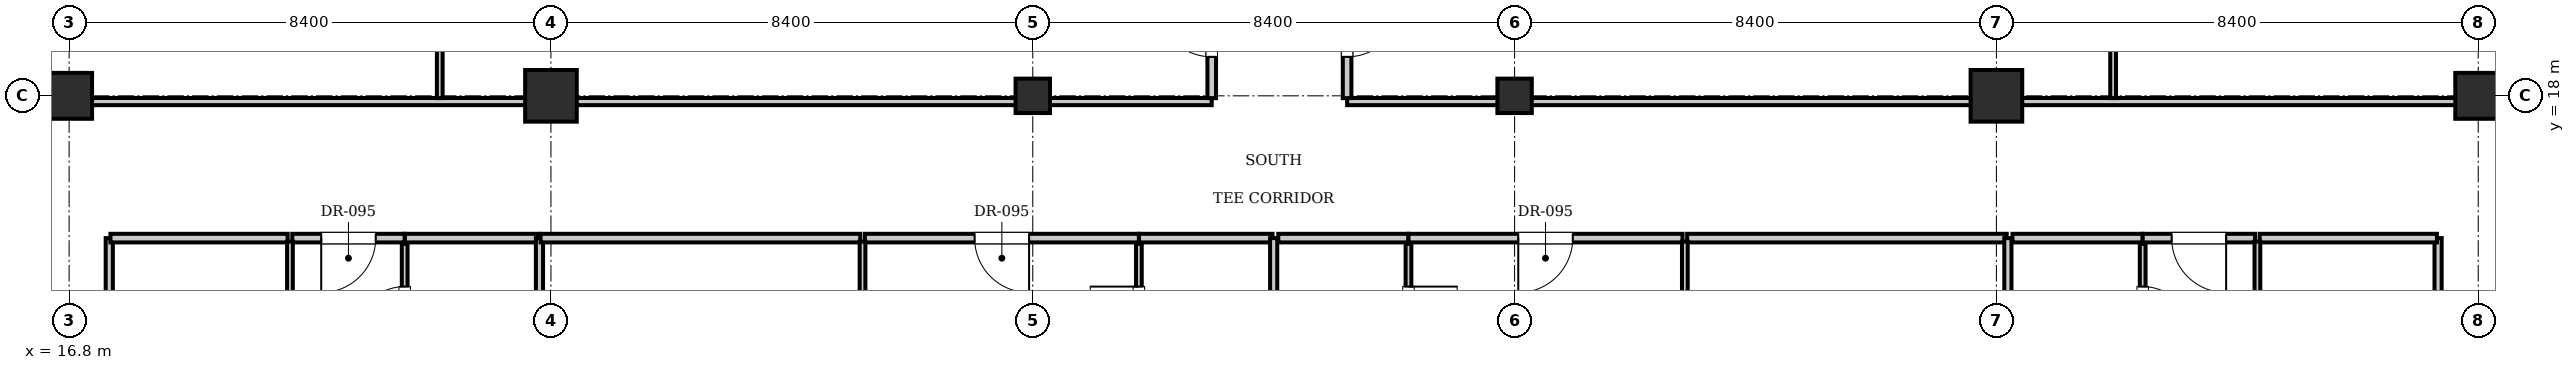
"""IFC4 building model, lengths in metres.
Left out: names, types, materials, properties, quantities, classifications, styles, units other than length and angle.
Written with IfcOpenShell. Run it as: python <this file> out.ifc"""

import sys

from ifc_helpers import new_model, si_unit, direction, frame, frame_2d, origin, origin_2d, place, context, subcontext, project, spatial, rectangle, i_section, extrude, element, fill, save


model = new_model("IFC4")
c1 = context("Model", 3, precision=1e-05, world=origin(), true_north=direction((0.0, 1.0)))
c2 = subcontext(c1, "Body", "Model", "MODEL_VIEW")
j1 = project(units=[si_unit("LENGTHUNIT", "METRE"), si_unit("PLANEANGLEUNIT", "RADIAN")], contexts=[c1])
p1 = place(None, origin())
s1 = spatial("IfcSite", under=j1, at=p1, CompositionType="ELEMENT")
p2 = place(p1, origin())
s2 = spatial("IfcBuilding", under=s1, at=p2, CompositionType="ELEMENT")
p3 = place(p2, frame((0.0, 0.0, 208.25)))
s3 = spatial("IfcBuildingStorey", under=s2, at=p3, CompositionType="ELEMENT", Elevation=208.25)
for number, where, z_axis, x_axis in (
    (1, (25.2, 18.0, 0.0), (0.0, 0.0, 1.0), (1.0, 0.0, 0.0)),
    (2, (50.4, 18.0, 0.0), (0.0, 0.0, 1.0), (1.0, 0.0, 0.0)),
):
    element("IfcColumn", number, at=place(p3, frame(where, z_axis=z_axis, x_axis=x_axis)), inside=s3, PredefinedType="COLUMN", context=c2, shape_type="SweptSolid", body=[
        extrude(rectangle(XDim=0.9, YDim=0.9, at=origin_2d()), origin(), (0.0, 0.0, 1.0), 3.85),
    ])
for number, where, z_axis, x_axis in (
    (3, (33.6, 18.0, 0.0), (0.0, 0.0, 1.0), (1.0, 0.0, 0.0)),
    (4, (42.0, 18.0, 0.0), (0.0, 0.0, 1.0), (1.0, 0.0, 0.0)),
):
    element("IfcColumn", number, at=place(p3, frame(where, z_axis=z_axis, x_axis=x_axis)), inside=s3, PredefinedType="COLUMN", context=c2, shape_type="SweptSolid", body=[
        extrude(i_section(OverallWidth=0.6, OverallDepth=0.6, WebThickness=0.025, FlangeThickness=0.038, at=origin_2d()), origin(), (0.0, 0.0, 1.0), 3.85),
    ])
for number, where, z_axis, x_axis in (
    (5, (16.8, 18.0, 0.0), (0.0, 0.0, 1.0), (1.0, 0.0, 0.0)),
    (6, (58.8, 18.0, 0.0), (0.0, 0.0, 1.0), (1.0, 0.0, 0.0)),
):
    element("IfcColumn", number, at=place(p3, frame(where, z_axis=z_axis, x_axis=x_axis)), inside=s3, PredefinedType="COLUMN", context=c2, shape_type="SweptSolid", body=[
        extrude(rectangle(XDim=0.8, YDim=0.8, at=origin_2d()), origin(), (0.0, 0.0, 1.0), 3.85),
    ])
for number, where, z_axis, x_axis in (
    (7, (17.5, 9.0, 0.0), (0.0, 0.0, 1.0), (0.0, 1.0, 0.0)),
    (8, (58.1, 9.0, 0.0), (0.0, 0.0, 1.0), (0.0, 1.0, 0.0)),
):
    element("IfcWall", number, at=place(p3, frame(where, z_axis=z_axis, x_axis=x_axis)), inside=s3, PredefinedType="PARTITIONING", context=c2, shape_type="SweptSolid", body=[
        extrude(rectangle(XDim=6.52, YDim=0.125, at=frame_2d((3.26, 0.0))), origin(), (0.0, 0.0, 1.0), 3.61),
    ])
p4 = place(p3, frame((22.65, 15.52, 0.0), z_axis=(0.0, 0.0, 1.0), x_axis=(1.0, 0.0, 0.0)))
e9 = element("IfcWall", 9, at=p4, inside=s3, PredefinedType="PARTITIONING", context=c2, shape_type="SweptSolid", body=[
    extrude(rectangle(XDim=2.33, YDim=0.15, at=frame_2d((1.165, 0.0))), origin(), (0.0, 0.0, 1.0), 3.61),
])
p5 = place(p3, frame((22.65, 13.08, 0.0), z_axis=(0.0, 0.0, 1.0), x_axis=(0.0, 1.0, 0.0)))
e10 = element("IfcWall", 10, at=p5, inside=s3, PredefinedType="PARTITIONING", context=c2, shape_type="SweptSolid", body=[
    extrude(rectangle(XDim=2.34, YDim=0.1, at=frame_2d((1.17, 0.0))), origin(), (0.0, 0.0, 1.0), 3.61),
])
p6 = place(p5, frame((0.745, 0.0, 0.0)))
e11 = element("IfcOpeningElement", 11, at=p6, cuts=e10, PredefinedType="OPENING", context=c2, shape_type="SweptSolid", body=[
    extrude(rectangle(XDim=0.85, YDim=2.1, at=frame_2d((0.425, 1.05))), frame((0.0, 0.06, 0.0), z_axis=(0.0, -1.0, 0.0), x_axis=(1.0, 0.0, 0.0)), (0.0, 0.0, 1.0), 0.12),
])
p7 = place(p3, frame((17.52, 15.52, 0.0), z_axis=(0.0, 0.0, 1.0), x_axis=(1.0, 0.0, 0.0)))
e12 = element("IfcWall", 12, at=p7, inside=s3, PredefinedType="PARTITIONING", context=c2, shape_type="SweptSolid", body=[
    extrude(rectangle(XDim=3.09, YDim=0.15, at=frame_2d((1.545, 0.0))), origin(), (0.0, 0.0, 1.0), 3.61),
])
p8 = place(p3, frame((20.69, 15.52, 0.0), z_axis=(0.0, 0.0, 1.0), x_axis=(1.0, 0.0, 0.0)))
e13 = element("IfcWall", 13, at=p8, inside=s3, PredefinedType="PARTITIONING", context=c2, shape_type="SweptSolid", body=[
    extrude(rectangle(XDim=1.96, YDim=0.15, at=frame_2d((0.98, 0.0))), origin(), (0.0, 0.0, 1.0), 3.61),
])
p9 = place(p8, frame((0.505, 0.0, 0.0)))
e14 = element("IfcOpeningElement", 14, at=p9, cuts=e13, PredefinedType="OPENING", context=c2, shape_type="SweptSolid", body=[
    extrude(rectangle(XDim=0.95, YDim=2.15, at=frame_2d((0.475, 1.075))), frame((0.0, 0.085, 0.0), z_axis=(0.0, -1.0, 0.0), x_axis=(1.0, 0.0, 0.0)), (0.0, 0.0, 1.0), 0.17),
])
p10 = place(p3, frame((20.65, 4.63, 0.0), z_axis=(0.0, 0.0, 1.0), x_axis=(0.0, 1.0, 0.0)))
e15 = element("IfcWall", 15, at=p10, inside=s3, PredefinedType="PARTITIONING", context=c2, shape_type="SweptSolid", body=[
    extrude(rectangle(XDim=10.83, YDim=0.1, at=frame_2d((5.415, 0.0))), origin(), (0.0, 0.0, 1.0), 3.61),
])
p11 = place(p10, frame((1.6, 0.0, 0.0)))
e16 = element("IfcOpeningElement", 16, at=p11, cuts=e15, PredefinedType="OPENING", context=c2, shape_type="SweptSolid", body=[
    extrude(rectangle(XDim=0.9, YDim=2.1, at=frame_2d((0.45, 1.05))), frame((0.0, 0.06, 0.0), z_axis=(0.0, -1.0, 0.0), x_axis=(1.0, 0.0, 0.0)), (0.0, 0.0, 1.0), 0.12),
])
p12 = place(p3, frame((25.0, 4.7, 0.0), z_axis=(0.0, 0.0, 1.0), x_axis=(0.0, 1.0, 0.0)))
e17 = element("IfcWall", 17, at=p12, inside=s3, PredefinedType="PARTITIONING", context=c2, shape_type="SweptSolid", body=[
    extrude(rectangle(XDim=10.82, YDim=0.125, at=frame_2d((5.41, 0.0))), origin(), (0.0, 0.0, 1.0), 3.61),
])
p13 = place(p3, frame((35.45, 15.52, 0.0), z_axis=(0.0, 0.0, 1.0), x_axis=(1.0, 0.0, 0.0)))
e18 = element("IfcWall", 18, at=p13, inside=s3, PredefinedType="PARTITIONING", context=c2, shape_type="SweptSolid", body=[
    extrude(rectangle(XDim=2.33, YDim=0.15, at=frame_2d((1.165, 0.0))), origin(), (0.0, 0.0, 1.0), 3.61),
])
p14 = place(p3, frame((35.45, 13.08, 0.0), z_axis=(0.0, 0.0, 1.0), x_axis=(0.0, 1.0, 0.0)))
e19 = element("IfcWall", 19, at=p14, inside=s3, PredefinedType="PARTITIONING", context=c2, shape_type="SweptSolid", body=[
    extrude(rectangle(XDim=2.34, YDim=0.1, at=frame_2d((1.17, 0.0))), origin(), (0.0, 0.0, 1.0), 3.61),
])
p15 = place(p14, frame((0.745, 0.0, 0.0)))
e20 = element("IfcOpeningElement", 20, at=p15, cuts=e19, PredefinedType="OPENING", context=c2, shape_type="SweptSolid", body=[
    extrude(rectangle(XDim=0.85, YDim=2.1, at=frame_2d((0.425, 1.05))), frame((0.0, 0.06, 0.0), z_axis=(0.0, -1.0, 0.0), x_axis=(1.0, 0.0, 0.0)), (0.0, 0.0, 1.0), 0.12),
])
p16 = place(p3, frame((25.02, 15.52, 0.0), z_axis=(0.0, 0.0, 1.0), x_axis=(1.0, 0.0, 0.0)))
e21 = element("IfcWall", 21, at=p16, inside=s3, PredefinedType="PARTITIONING", context=c2, shape_type="SweptSolid", body=[
    extrude(rectangle(XDim=5.572, YDim=0.15, at=frame_2d((2.786, 0.0))), origin(), (0.0, 0.0, 1.0), 3.61),
])
p17 = place(p3, frame((30.672, 15.52, 0.0), z_axis=(0.0, 0.0, 1.0), x_axis=(1.0, 0.0, 0.0)))
e22 = element("IfcWall", 22, at=p17, inside=s3, PredefinedType="PARTITIONING", context=c2, shape_type="SweptSolid", body=[
    extrude(rectangle(XDim=4.778, YDim=0.15, at=frame_2d((2.389, 0.0))), origin(), (0.0, 0.0, 1.0), 3.61),
])
p18 = place(p17, frame((1.914, 0.0, 0.0)))
e23 = element("IfcOpeningElement", 23, at=p18, cuts=e22, PredefinedType="OPENING", context=c2, shape_type="SweptSolid", body=[
    extrude(rectangle(XDim=0.95, YDim=2.15, at=frame_2d((0.475, 1.075))), frame((0.0, 0.085, 0.0), z_axis=(0.0, -1.0, 0.0), x_axis=(1.0, 0.0, 0.0)), (0.0, 0.0, 1.0), 0.17),
])
p19 = place(p3, frame((30.632, 4.63, 0.0), z_axis=(0.0, 0.0, 1.0), x_axis=(0.0, 1.0, 0.0)))
e24 = element("IfcWall", 24, at=p19, inside=s3, PredefinedType="PARTITIONING", context=c2, shape_type="SweptSolid", body=[
    extrude(rectangle(XDim=10.83, YDim=0.1, at=frame_2d((5.415, 0.0))), origin(), (0.0, 0.0, 1.0), 3.61),
])
p20 = place(p19, frame((1.6, 0.0, 0.0)))
e25 = element("IfcOpeningElement", 25, at=p20, cuts=e24, PredefinedType="OPENING", context=c2, shape_type="SweptSolid", body=[
    extrude(rectangle(XDim=0.9, YDim=2.1, at=frame_2d((0.45, 1.05))), frame((0.0, 0.06, 0.0), z_axis=(0.0, -1.0, 0.0), x_axis=(1.0, 0.0, 0.0)), (0.0, 0.0, 1.0), 0.12),
])
p21 = place(p3, frame((37.8, 4.7, 0.0), z_axis=(0.0, 0.0, 1.0), x_axis=(0.0, 1.0, 0.0)))
e26 = element("IfcWall", 26, at=p21, inside=s3, PredefinedType="PARTITIONING", context=c2, shape_type="SweptSolid", body=[
    extrude(rectangle(XDim=10.82, YDim=0.125, at=frame_2d((5.41, 0.0))), origin(), (0.0, 0.0, 1.0), 3.207),
])
p22 = place(p3, frame((37.88, 15.52, 0.0), z_axis=(0.0, 0.0, 1.0), x_axis=(1.0, 0.0, 0.0)))
e27 = element("IfcWall", 27, at=p22, inside=s3, PredefinedType="PARTITIONING", context=c2, shape_type="SweptSolid", body=[
    extrude(rectangle(XDim=2.27, YDim=0.15, at=frame_2d((1.135, 0.0))), origin(), (0.0, 0.0, 1.0), 3.61),
])
p23 = place(p3, frame((40.15, 13.08, 0.0), z_axis=(0.0, 0.0, 1.0), x_axis=(0.0, 1.0, 0.0)))
e28 = element("IfcWall", 28, at=p23, inside=s3, PredefinedType="PARTITIONING", context=c2, shape_type="SweptSolid", body=[
    extrude(rectangle(XDim=2.34, YDim=0.1, at=frame_2d((1.17, 0.0))), origin(), (0.0, 0.0, 1.0), 3.61),
])
p24 = place(p23, frame((0.745, 0.0, 0.0)))
e29 = element("IfcOpeningElement", 29, at=p24, cuts=e28, PredefinedType="OPENING", context=c2, shape_type="SweptSolid", body=[
    extrude(rectangle(XDim=0.85, YDim=2.1, at=frame_2d((0.425, 1.05))), frame((0.0, 0.06, 0.0), z_axis=(0.0, -1.0, 0.0), x_axis=(1.0, 0.0, 0.0)), (0.0, 0.0, 1.0), 0.12),
])
p25 = place(p3, frame((40.15, 15.52, 0.0), z_axis=(0.0, 0.0, 1.0), x_axis=(1.0, 0.0, 0.0)))
e30 = element("IfcWall", 30, at=p25, inside=s3, PredefinedType="PARTITIONING", context=c2, shape_type="SweptSolid", body=[
    extrude(rectangle(XDim=4.778, YDim=0.15, at=frame_2d((2.389, 0.0))), origin(), (0.0, 0.0, 1.0), 3.61),
])
p26 = place(p25, frame((1.914, 0.0, 0.0)))
e31 = element("IfcOpeningElement", 31, at=p26, cuts=e30, PredefinedType="OPENING", context=c2, shape_type="SweptSolid", body=[
    extrude(rectangle(XDim=0.95, YDim=2.15, at=frame_2d((0.475, 1.075))), frame((0.0, 0.085, 0.0), z_axis=(0.0, -1.0, 0.0), x_axis=(1.0, 0.0, 0.0)), (0.0, 0.0, 1.0), 0.17),
])
p27 = place(p3, frame((45.008, 15.52, 0.0), z_axis=(0.0, 0.0, 1.0), x_axis=(1.0, 0.0, 0.0)))
e32 = element("IfcWall", 32, at=p27, inside=s3, PredefinedType="PARTITIONING", context=c2, shape_type="SweptSolid", body=[
    extrude(rectangle(XDim=5.572, YDim=0.15, at=frame_2d((2.786, 0.0))), origin(), (0.0, 0.0, 1.0), 3.61),
])
p28 = place(p3, frame((44.968, 4.63, 0.0), z_axis=(0.0, 0.0, 1.0), x_axis=(0.0, 1.0, 0.0)))
e33 = element("IfcWall", 33, at=p28, inside=s3, PredefinedType="PARTITIONING", context=c2, shape_type="SweptSolid", body=[
    extrude(rectangle(XDim=10.83, YDim=0.1, at=frame_2d((5.415, 0.0))), origin(), (0.0, 0.0, 1.0), 3.61),
])
p29 = place(p28, frame((1.6, 0.0, 0.0)))
e34 = element("IfcOpeningElement", 34, at=p29, cuts=e33, PredefinedType="OPENING", context=c2, shape_type="SweptSolid", body=[
    extrude(rectangle(XDim=0.9, YDim=2.1, at=frame_2d((0.45, 1.05))), frame((0.0, 0.06, 0.0), z_axis=(0.0, -1.0, 0.0), x_axis=(1.0, 0.0, 0.0)), (0.0, 0.0, 1.0), 0.12),
])
p30 = place(p3, frame((50.6, 4.7, 0.0), z_axis=(0.0, 0.0, 1.0), x_axis=(0.0, 1.0, 0.0)))
e35 = element("IfcWall", 35, at=p30, inside=s3, PredefinedType="PARTITIONING", context=c2, shape_type="SweptSolid", body=[
    extrude(rectangle(XDim=10.82, YDim=0.125, at=frame_2d((5.41, 0.0))), origin(), (0.0, 0.0, 1.0), 3.61),
])
p31 = place(p3, frame((50.68, 15.52, 0.0), z_axis=(0.0, 0.0, 1.0), x_axis=(1.0, 0.0, 0.0)))
e36 = element("IfcWall", 36, at=p31, inside=s3, PredefinedType="PARTITIONING", context=c2, shape_type="SweptSolid", body=[
    extrude(rectangle(XDim=2.27, YDim=0.15, at=frame_2d((1.135, 0.0))), origin(), (0.0, 0.0, 1.0), 3.61),
])
p32 = place(p3, frame((52.95, 13.08, 0.0), z_axis=(0.0, 0.0, 1.0), x_axis=(0.0, 1.0, 0.0)))
e37 = element("IfcWall", 37, at=p32, inside=s3, PredefinedType="PARTITIONING", context=c2, shape_type="SweptSolid", body=[
    extrude(rectangle(XDim=2.34, YDim=0.1, at=frame_2d((1.17, 0.0))), origin(), (0.0, 0.0, 1.0), 3.61),
])
p33 = place(p32, frame((0.745, 0.0, 0.0)))
e38 = element("IfcOpeningElement", 38, at=p33, cuts=e37, PredefinedType="OPENING", context=c2, shape_type="SweptSolid", body=[
    extrude(rectangle(XDim=0.85, YDim=2.1, at=frame_2d((0.425, 1.05))), frame((0.0, 0.06, 0.0), z_axis=(0.0, -1.0, 0.0), x_axis=(1.0, 0.0, 0.0)), (0.0, 0.0, 1.0), 0.12),
])
p34 = place(p3, frame((52.95, 15.52, 0.0), z_axis=(0.0, 0.0, 1.0), x_axis=(1.0, 0.0, 0.0)))
e39 = element("IfcWall", 39, at=p34, inside=s3, PredefinedType="PARTITIONING", context=c2, shape_type="SweptSolid", body=[
    extrude(rectangle(XDim=1.96, YDim=0.15, at=frame_2d((0.98, 0.0))), origin(), (0.0, 0.0, 1.0), 3.61),
])
p35 = place(p34, frame((0.505, 0.0, 0.0)))
e40 = element("IfcOpeningElement", 40, at=p35, cuts=e39, PredefinedType="OPENING", context=c2, shape_type="SweptSolid", body=[
    extrude(rectangle(XDim=0.95, YDim=2.15, at=frame_2d((0.475, 1.075))), frame((0.0, 0.085, 0.0), z_axis=(0.0, -1.0, 0.0), x_axis=(1.0, 0.0, 0.0)), (0.0, 0.0, 1.0), 0.17),
])
p36 = place(p3, frame((54.99, 15.52, 0.0), z_axis=(0.0, 0.0, 1.0), x_axis=(1.0, 0.0, 0.0)))
e41 = element("IfcWall", 41, at=p36, inside=s3, PredefinedType="PARTITIONING", context=c2, shape_type="SweptSolid", body=[
    extrude(rectangle(XDim=3.09, YDim=0.15, at=frame_2d((1.545, 0.0))), origin(), (0.0, 0.0, 1.0), 3.61),
])
p37 = place(p3, frame((54.95, 4.63, 0.0), z_axis=(0.0, 0.0, 1.0), x_axis=(0.0, 1.0, 0.0)))
e42 = element("IfcWall", 42, at=p37, inside=s3, PredefinedType="PARTITIONING", context=c2, shape_type="SweptSolid", body=[
    extrude(rectangle(XDim=10.83, YDim=0.1, at=frame_2d((5.415, 0.0))), origin(), (0.0, 0.0, 1.0), 3.61),
])
p38 = place(p37, frame((1.6, 0.0, 0.0)))
e43 = element("IfcOpeningElement", 43, at=p38, cuts=e42, PredefinedType="OPENING", context=c2, shape_type="SweptSolid", body=[
    extrude(rectangle(XDim=0.9, YDim=2.1, at=frame_2d((0.45, 1.05))), frame((0.0, 0.06, 0.0), z_axis=(0.0, -1.0, 0.0), x_axis=(1.0, 0.0, 0.0)), (0.0, 0.0, 1.0), 0.12),
])
p39 = place(p3, frame((13.2, 17.9, 0.0), z_axis=(0.0, 0.0, 1.0), x_axis=(1.0, 0.0, 0.0)))
e44 = element("IfcWall", 44, at=p39, inside=s3, PredefinedType="PARTITIONING", context=c2, shape_type="SweptSolid", body=[
    extrude(rectangle(XDim=23.52, YDim=0.125, at=frame_2d((11.76, 0.0))), origin(), (0.0, 0.0, 1.0), 3.071),
])
p40 = place(p3, frame((39.08, 17.9, 0.0), z_axis=(0.0, 0.0, 1.0), x_axis=(1.0, 0.0, 0.0)))
e45 = element("IfcWall", 45, at=p40, inside=s3, PredefinedType="PARTITIONING", context=c2, shape_type="SweptSolid", body=[
    extrude(rectangle(XDim=23.32, YDim=0.125, at=frame_2d((11.66, 0.0))), origin(), (0.0, 0.0, 1.0), 3.071),
])
p41 = place(p3, frame((36.72, 17.96, 0.0), z_axis=(0.0, 0.0, 1.0), x_axis=(0.0, 1.0, 0.0)))
e46 = element("IfcWall", 46, at=p41, inside=s3, PredefinedType="PARTITIONING", context=c2, shape_type="SweptSolid", body=[
    extrude(rectangle(XDim=2.39, YDim=0.15, at=frame_2d((1.195, 0.0))), origin(), (0.0, 0.0, 1.0), 3.61),
])
p42 = place(p41, frame((0.72, 0.0, 0.0)))
e47 = element("IfcOpeningElement", 47, at=p42, cuts=e46, PredefinedType="OPENING", context=c2, shape_type="SweptSolid", body=[
    extrude(rectangle(XDim=0.95, YDim=2.15, at=frame_2d((0.475, 1.075))), frame((0.0, 0.085, 0.0), z_axis=(0.0, -1.0, 0.0), x_axis=(1.0, 0.0, 0.0)), (0.0, 0.0, 1.0), 0.17),
])
p43 = place(p3, frame((23.262, 17.96, 0.0), z_axis=(0.0, 0.0, 1.0), x_axis=(0.0, 1.0, 0.0)))
e48 = element("IfcWall", 48, at=p43, inside=s3, PredefinedType="PARTITIONING", context=c2, shape_type="SweptSolid", body=[
    extrude(rectangle(XDim=4.28, YDim=0.1, at=frame_2d((2.14, 0.0))), origin(), (0.0, 0.0, 1.0), 3.61),
])
p44 = place(p43, frame((1.69, 0.0, 0.0)))
e49 = element("IfcOpeningElement", 49, at=p44, cuts=e48, PredefinedType="OPENING", context=c2, shape_type="SweptSolid", body=[
    extrude(rectangle(XDim=0.9, YDim=2.1, at=frame_2d((0.45, 1.05))), frame((0.0, 0.06, 0.0), z_axis=(0.0, -1.0, 0.0), x_axis=(1.0, 0.0, 0.0)), (0.0, 0.0, 1.0), 0.12),
])
p45 = place(p3, frame((39.08, 17.96, 0.0), z_axis=(0.0, 0.0, 1.0), x_axis=(0.0, 1.0, 0.0)))
e50 = element("IfcWall", 50, at=p45, inside=s3, PredefinedType="PARTITIONING", context=c2, shape_type="SweptSolid", body=[
    extrude(rectangle(XDim=2.39, YDim=0.15, at=frame_2d((1.195, 0.0))), origin(), (0.0, 0.0, 1.0), 3.61),
])
p46 = place(p45, frame((0.72, 0.0, 0.0)))
e51 = element("IfcOpeningElement", 51, at=p46, cuts=e50, PredefinedType="OPENING", context=c2, shape_type="SweptSolid", body=[
    extrude(rectangle(XDim=0.95, YDim=2.15, at=frame_2d((0.475, 1.075))), frame((0.0, 0.085, 0.0), z_axis=(0.0, -1.0, 0.0), x_axis=(1.0, 0.0, 0.0)), (0.0, 0.0, 1.0), 0.17),
])
p47 = place(p3, frame((52.434, 17.96, 0.0), z_axis=(0.0, 0.0, 1.0), x_axis=(0.0, 1.0, 0.0)))
e52 = element("IfcWall", 52, at=p47, inside=s3, PredefinedType="PARTITIONING", context=c2, shape_type="SweptSolid", body=[
    extrude(rectangle(XDim=4.28, YDim=0.1, at=frame_2d((2.14, 0.0))), origin(), (0.0, 0.0, 1.0), 3.61),
])
p48 = place(p47, frame((1.69, 0.0, 0.0)))
e53 = element("IfcOpeningElement", 53, at=p48, cuts=e52, PredefinedType="OPENING", context=c2, shape_type="SweptSolid", body=[
    extrude(rectangle(XDim=0.9, YDim=2.1, at=frame_2d((0.45, 1.05))), frame((0.0, 0.06, 0.0), z_axis=(0.0, -1.0, 0.0), x_axis=(1.0, 0.0, 0.0)), (0.0, 0.0, 1.0), 0.12),
])
p49 = place(p6, origin())
e54 = element("IfcDoor", 54, at=p49, inside=s3, OperationType="SINGLE_SWING_LEFT", PredefinedType="DOOR", context=c2, shape_type="SweptSolid", body=[
    extrude(rectangle(XDim=0.85, YDim=2.1, at=frame_2d((0.425, 1.05))), frame((0.0, 0.025, 0.0), z_axis=(0.0, -1.0, 0.0), x_axis=(1.0, 0.0, 0.0)), (0.0, 0.0, 1.0), 0.05),
])
fill(e11, e54)
p50 = place(p9, frame((0.95, 0.0, 0.0), z_axis=(0.0, 0.0, 1.0), x_axis=(-1.0, 0.0, 0.0)))
e55 = element("IfcDoor", 55, at=p50, inside=s3, OperationType="SINGLE_SWING_RIGHT", PredefinedType="DOOR", context=c2, shape_type="SweptSolid", body=[
    extrude(rectangle(XDim=0.95, YDim=2.15, at=frame_2d((0.475, 1.075))), frame((0.0, 0.025, 0.0), z_axis=(0.0, -1.0, 0.0), x_axis=(1.0, 0.0, 0.0)), (0.0, 0.0, 1.0), 0.05),
])
fill(e14, e55)
p51 = place(p15, origin())
e56 = element("IfcDoor", 56, at=p51, inside=s3, OperationType="SINGLE_SWING_RIGHT", PredefinedType="DOOR", context=c2, shape_type="SweptSolid", body=[
    extrude(rectangle(XDim=0.85, YDim=2.1, at=frame_2d((0.425, 1.05))), frame((0.0, 0.025, 0.0), z_axis=(0.0, -1.0, 0.0), x_axis=(1.0, 0.0, 0.0)), (0.0, 0.0, 1.0), 0.05),
])
fill(e20, e56)
p52 = place(p18, frame((0.95, 0.0, 0.0), z_axis=(0.0, 0.0, 1.0), x_axis=(-1.0, 0.0, 0.0)))
e57 = element("IfcDoor", 57, at=p52, inside=s3, OperationType="SINGLE_SWING_LEFT", PredefinedType="DOOR", context=c2, shape_type="SweptSolid", body=[
    extrude(rectangle(XDim=0.95, YDim=2.15, at=frame_2d((0.475, 1.075))), frame((0.0, 0.025, 0.0), z_axis=(0.0, -1.0, 0.0), x_axis=(1.0, 0.0, 0.0)), (0.0, 0.0, 1.0), 0.05),
])
fill(e23, e57)
p53 = place(p24, frame((0.85, 0.0, 0.0), z_axis=(0.0, 0.0, 1.0), x_axis=(-1.0, 0.0, 0.0)))
e58 = element("IfcDoor", 58, at=p53, inside=s3, OperationType="SINGLE_SWING_LEFT", PredefinedType="DOOR", context=c2, shape_type="SweptSolid", body=[
    extrude(rectangle(XDim=0.85, YDim=2.1, at=frame_2d((0.425, 1.05))), frame((0.0, 0.025, 0.0), z_axis=(0.0, -1.0, 0.0), x_axis=(1.0, 0.0, 0.0)), (0.0, 0.0, 1.0), 0.05),
])
fill(e29, e58)
p54 = place(p26, frame((0.95, 0.0, 0.0), z_axis=(0.0, 0.0, 1.0), x_axis=(-1.0, 0.0, 0.0)))
e59 = element("IfcDoor", 59, at=p54, inside=s3, OperationType="SINGLE_SWING_RIGHT", PredefinedType="DOOR", context=c2, shape_type="SweptSolid", body=[
    extrude(rectangle(XDim=0.95, YDim=2.15, at=frame_2d((0.475, 1.075))), frame((0.0, 0.025, 0.0), z_axis=(0.0, -1.0, 0.0), x_axis=(1.0, 0.0, 0.0)), (0.0, 0.0, 1.0), 0.05),
])
fill(e31, e59)
p55 = place(p33, frame((0.85, 0.0, 0.0), z_axis=(0.0, 0.0, 1.0), x_axis=(-1.0, 0.0, 0.0)))
e60 = element("IfcDoor", 60, at=p55, inside=s3, OperationType="SINGLE_SWING_RIGHT", PredefinedType="DOOR", context=c2, shape_type="SweptSolid", body=[
    extrude(rectangle(XDim=0.85, YDim=2.1, at=frame_2d((0.425, 1.05))), frame((0.0, 0.025, 0.0), z_axis=(0.0, -1.0, 0.0), x_axis=(1.0, 0.0, 0.0)), (0.0, 0.0, 1.0), 0.05),
])
fill(e38, e60)
p56 = place(p35, frame((0.95, 0.0, 0.0), z_axis=(0.0, 0.0, 1.0), x_axis=(-1.0, 0.0, 0.0)))
e61 = element("IfcDoor", 61, at=p56, inside=s3, OperationType="SINGLE_SWING_LEFT", PredefinedType="DOOR", context=c2, shape_type="SweptSolid", body=[
    extrude(rectangle(XDim=0.95, YDim=2.15, at=frame_2d((0.475, 1.075))), frame((0.0, 0.025, 0.0), z_axis=(0.0, -1.0, 0.0), x_axis=(1.0, 0.0, 0.0)), (0.0, 0.0, 1.0), 0.05),
])
fill(e40, e61)
p57 = place(p42, origin())
e62 = element("IfcDoor", 62, at=p57, inside=s3, OperationType="SINGLE_SWING_RIGHT", PredefinedType="DOOR", context=c2, shape_type="SweptSolid", body=[
    extrude(rectangle(XDim=0.95, YDim=2.15, at=frame_2d((0.475, 1.075))), frame((0.0, 0.025, 0.0), z_axis=(0.0, -1.0, 0.0), x_axis=(1.0, 0.0, 0.0)), (0.0, 0.0, 1.0), 0.05),
])
fill(e47, e62)
p58 = place(p46, frame((0.95, 0.0, 0.0), z_axis=(0.0, 0.0, 1.0), x_axis=(-1.0, 0.0, 0.0)))
e63 = element("IfcDoor", 63, at=p58, inside=s3, OperationType="SINGLE_SWING_LEFT", PredefinedType="DOOR", context=c2, shape_type="SweptSolid", body=[
    extrude(rectangle(XDim=0.95, YDim=2.15, at=frame_2d((0.475, 1.075))), frame((0.0, 0.025, 0.0), z_axis=(0.0, -1.0, 0.0), x_axis=(1.0, 0.0, 0.0)), (0.0, 0.0, 1.0), 0.05),
])
fill(e51, e63)
save(model, sys.argv[1])
